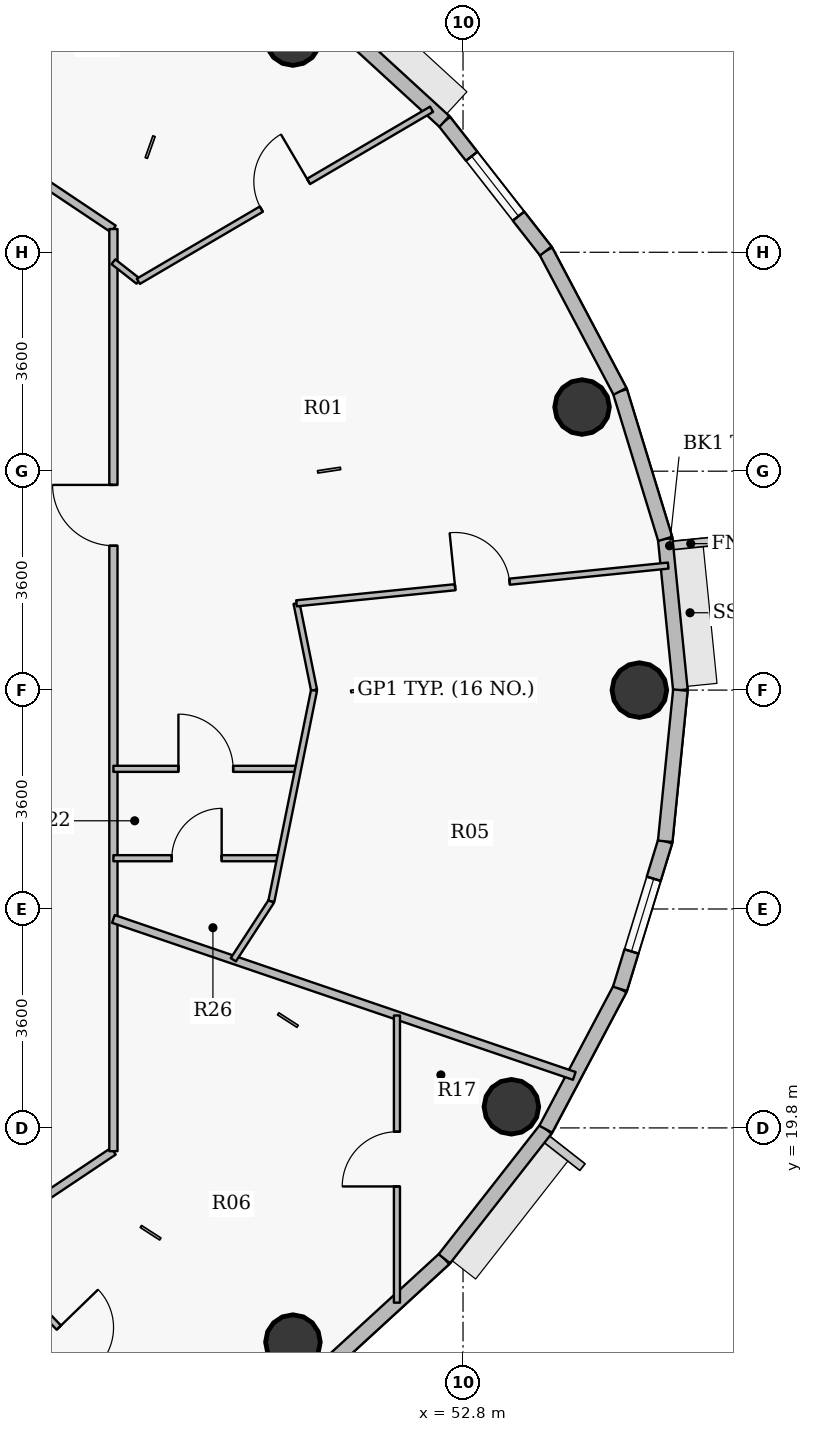
"""IFC4 building model, lengths in metres.
Left out: names, types, materials, properties, quantities, classifications, styles, units other than length and angle.
Written with IfcOpenShell. Run it as: python <this file> out.ifc"""

import sys

from ifc_helpers import new_model, si_unit, direction, frame, frame_2d, origin, origin_2d, place, context, subcontext, project, spatial, rectangle, hollow_circle, extrude, source, transform, mapped, element, fill, save


model = new_model("IFC4")
c1 = context("Model", 3, precision=1e-05, world=origin(), true_north=direction((0.0, 1.0)))
c2 = subcontext(c1, "Body", "Model", "MODEL_VIEW")
j1 = project(units=[si_unit("LENGTHUNIT", "METRE"), si_unit("PLANEANGLEUNIT", "RADIAN")], contexts=[c1])
p1 = place(None, origin())
s1 = spatial("IfcSite", under=j1, at=p1, CompositionType="ELEMENT")
p2 = place(p1, origin())
s2 = spatial("IfcBuilding", under=s1, at=p2, CompositionType="ELEMENT")
p3 = place(p2, frame((0.0, 0.0, 327.8)))
s3 = spatial("IfcBuildingStorey", under=s2, at=p3, CompositionType="ELEMENT", Elevation=327.8)
for number, where, z_axis, x_axis in (
    (1, (55.7, 27.0, 0.0), (0.0, 0.0, 1.0), (1.0, 0.0, 0.0)),
    (2, (54.758, 31.655, 0.0), (0.0, 0.0, 1.0), (1.0, 0.0, 0.0)),
    (3, (50.002, 37.723, 0.0), (0.0, 0.0, 1.0), (1.0, 0.0, 0.0)),
    (4, (50.002, 16.277, 0.0), (0.0, 0.0, 1.0), (1.0, 0.0, 0.0)),
    (5, (53.595, 20.147, 0.0), (0.0, 0.0, 1.0), (1.0, 0.0, 0.0)),
):
    element("IfcColumn", number, at=place(p3, frame(where, z_axis=z_axis, x_axis=x_axis)), inside=s3, PredefinedType="COLUMN", context=c2, shape_type="SweptSolid", body=[
        extrude(hollow_circle(Radius=0.45, WallThickness=0.028, at=origin_2d()), origin(), (0.0, 0.0, 1.0), 3.8),
    ])
p4 = place(p3, frame((56.125, 29.487, 0.0), z_axis=(0.0, 0.0, 1.0), x_axis=(0.100025963401, -0.994984827344, 0.0)))
e6 = element("IfcWall", 6, at=p4, inside=s3, PredefinedType="SOLIDWALL", context=c2, shape_type="SweptSolid", body=[
    extrude(rectangle(XDim=2.499, YDim=0.24, at=frame_2d((1.25, 0.0))), origin(), (0.0, 0.0, 1.0), 3.55),
])
p5 = place(p3, frame((55.381, 31.913, 0.0), z_axis=(0.0, 0.0, 1.0), x_axis=(0.293105547213, -0.956080089842, 0.0)))
e7 = element("IfcWall", 7, at=p5, inside=s3, PredefinedType="SOLIDWALL", context=c2, shape_type="SweptSolid", body=[
    extrude(rectangle(XDim=2.538, YDim=0.24, at=frame_2d((1.269, 0.0))), origin(), (0.0, 0.0, 1.0), 3.55),
])
p6 = place(p3, frame((54.161, 34.221, 0.0), z_axis=(0.0, 0.0, 1.0), x_axis=(0.467487999989, -0.883999417345, 0.0)))
e8 = element("IfcWall", 8, at=p6, inside=s3, PredefinedType="SOLIDWALL", context=c2, shape_type="SweptSolid", body=[
    extrude(rectangle(XDim=2.61, YDim=0.24, at=frame_2d((1.305, 0.0))), origin(), (0.0, 0.0, 1.0), 3.55),
])
p7 = place(p3, frame((52.493, 36.352, 0.0), z_axis=(0.0, 0.0, 1.0), x_axis=(0.616286367698, -0.78752213492, 0.0)))
e9 = element("IfcWall", 9, at=p7, inside=s3, PredefinedType="SOLIDWALL", context=c2, shape_type="SweptSolid", body=[
    extrude(rectangle(XDim=2.706, YDim=0.24, at=frame_2d((1.353, 0.0))), origin(), (0.0, 0.0, 1.0), 3.55),
])
p8 = place(p7, frame((0.728, 0.0, 0.9)))
e10 = element("IfcOpeningElement", 10, at=p8, cuts=e9, PredefinedType="OPENING", context=c2, shape_type="SweptSolid", body=[
    extrude(rectangle(XDim=1.25, YDim=1.65, at=origin_2d()), frame((0.625, 0.13, 0.825), z_axis=(0.0, -1.0, 0.0), x_axis=(1.0, 0.0, 0.0)), (0.0, 0.0, 1.0), 0.26),
])
for number, where, z_axis, x_axis in (
    (11, (50.419, 38.254, 0.0), (0.0, 0.0, 1.0), (0.737, -0.676, 0.0)),
    (12, (52.493, 17.648, 0.0), (0.0, 0.0, 1.0), (-0.737, -0.676, 0.0)),
):
    element("IfcWall", number, at=place(p3, frame(where, z_axis=z_axis, x_axis=x_axis)), inside=s3, PredefinedType="SOLIDWALL", context=c2, shape_type="SweptSolid", body=[
        extrude(rectangle(XDim=2.815, YDim=0.24, at=frame_2d((1.407, 0.0))), origin(), (0.0, 0.0, 1.0), 3.55),
    ])
p9 = place(p3, frame((54.161, 19.779, 0.0), z_axis=(0.0, 0.0, 1.0), x_axis=(-0.616286367698, -0.78752213492, 0.0)))
e13 = element("IfcWall", 13, at=p9, inside=s3, PredefinedType="SOLIDWALL", context=c2, shape_type="SweptSolid", body=[
    extrude(rectangle(XDim=2.706, YDim=0.24, at=frame_2d((1.353, 0.0))), origin(), (0.0, 0.0, 1.0), 3.55),
])
p10 = place(p3, frame((55.381, 22.087, 0.0), z_axis=(0.0, 0.0, 1.0), x_axis=(-0.467487999989, -0.883999417345, 0.0)))
e14 = element("IfcWall", 14, at=p10, inside=s3, PredefinedType="SOLIDWALL", context=c2, shape_type="SweptSolid", body=[
    extrude(rectangle(XDim=2.61, YDim=0.24, at=frame_2d((1.305, 0.0))), origin(), (0.0, 0.0, 1.0), 3.55),
])
p11 = place(p3, frame((56.125, 24.513, 0.0), z_axis=(0.0, 0.0, 1.0), x_axis=(-0.293105547213, -0.956080089842, 0.0)))
e15 = element("IfcWall", 15, at=p11, inside=s3, PredefinedType="SOLIDWALL", context=c2, shape_type="SweptSolid", body=[
    extrude(rectangle(XDim=2.538, YDim=0.24, at=frame_2d((1.269, 0.0))), origin(), (0.0, 0.0, 1.0), 3.55),
])
p12 = place(p11, frame((0.644, 0.0, 0.9)))
e16 = element("IfcOpeningElement", 16, at=p12, cuts=e15, PredefinedType="OPENING", context=c2, shape_type="SweptSolid", body=[
    extrude(rectangle(XDim=1.25, YDim=1.65, at=origin_2d()), frame((0.625, 0.13, 0.825), z_axis=(0.0, -1.0, 0.0), x_axis=(1.0, 0.0, 0.0)), (0.0, 0.0, 1.0), 0.26),
])
p13 = place(p3, frame((56.375, 27.0, 0.0), z_axis=(0.0, 0.0, 1.0), x_axis=(-0.100025963401, -0.994984827344, 0.0)))
e17 = element("IfcWall", 17, at=p13, inside=s3, PredefinedType="SOLIDWALL", context=c2, shape_type="SweptSolid", body=[
    extrude(rectangle(XDim=2.499, YDim=0.24, at=frame_2d((1.25, 0.0))), origin(), (0.0, 0.0, 1.0), 3.55),
])
p14 = place(p3, frame((44.645, 18.073, 0.0), z_axis=(0.0, 0.0, 1.0), x_axis=(0.695656073062, -0.718374991221, 0.0)))
e18 = element("IfcWall", 18, at=p14, inside=s3, PredefinedType="PARTITIONING", context=c2, shape_type="SweptSolid", body=[
    extrude(rectangle(XDim=5.233, YDim=0.1, at=frame_2d((2.617, 0.0))), origin(), (0.0, 0.0, 1.0), 3.035),
])
p15 = place(p14, frame((2.167, 0.0, 0.0)))
e19 = element("IfcOpeningElement", 19, at=p15, cuts=e18, PredefinedType="OPENING", context=c2, shape_type="SweptSolid", body=[
    extrude(rectangle(XDim=0.9, YDim=2.1, at=origin_2d()), frame((0.45, 0.06, 1.05), z_axis=(0.0, -1.0, 0.0), x_axis=(1.0, 0.0, 0.0)), (0.0, 0.0, 1.0), 0.12),
])
for number, where, z_axis, x_axis in (
    (20, (45.541, 18.408, 0.0), (0.0, 0.0, 1.0), (0.831, 0.556, 0.0)),
    (21, (45.541, 35.592, 0.0), (0.0, 0.0, 1.0), (0.831, -0.556, 0.0)),
):
    element("IfcWall", number, at=place(p3, frame(where, z_axis=z_axis, x_axis=x_axis)), inside=s3, PredefinedType="PARTITIONING", context=c2, shape_type="SweptSolid", body=[
        extrude(rectangle(XDim=1.815, YDim=0.135, at=frame_2d((0.908, 0.0))), origin(), (0.0, 0.0, 1.0), 3.085),
    ])
p16 = place(p3, frame((47.05, 19.417, 0.0), z_axis=(0.0, 0.0, 1.0), x_axis=(0.0, 1.0, 0.0)))
e22 = element("IfcWall", 22, at=p16, inside=s3, PredefinedType="PARTITIONING", context=c2, shape_type="SweptSolid", body=[
    extrude(rectangle(XDim=15.165, YDim=0.135, at=frame_2d((7.583, 0.0))), origin(), (0.0, 0.0, 1.0), 3.085),
])
p17 = place(p16, frame((9.957, 0.0, 0.0)))
e23 = element("IfcOpeningElement", 23, at=p17, cuts=e22, PredefinedType="OPENING", context=c2, shape_type="SweptSolid", body=[
    extrude(rectangle(XDim=1.0, YDim=2.15, at=origin_2d()), frame((0.5, 0.078, 1.075), z_axis=(0.0, -1.0, 0.0), x_axis=(1.0, 0.0, 0.0)), (0.0, 0.0, 1.0), 0.155),
])
p18 = place(p3, frame((47.05, 23.237, 0.0), z_axis=(0.0, 0.0, 1.0), x_axis=(0.946614475353, -0.32236785673, 0.0)))
e24 = element("IfcWall", 24, at=p18, inside=s3, PredefinedType="PARTITIONING", context=c2, shape_type="SweptSolid", body=[
    extrude(rectangle(XDim=8.007, YDim=0.135, at=frame_2d((4.004, 0.0))), origin(), (0.0, 0.0, 1.0), 3.035),
])
p19 = place(p3, frame((47.05, 24.235, 0.0), z_axis=(0.0, 0.0, 1.0), x_axis=(1.0, 0.0, 0.0)))
e25 = element("IfcWall", 25, at=p19, inside=s3, PredefinedType="PARTITIONING", context=c2, shape_type="SweptSolid", body=[
    extrude(rectangle(XDim=2.741, YDim=0.1, at=frame_2d((1.37, 0.0))), origin(), (0.0, 0.0, 1.0), 3.55),
])
p20 = place(p19, frame((0.96, 0.0, 0.0)))
e26 = element("IfcOpeningElement", 26, at=p20, cuts=e25, PredefinedType="OPENING", context=c2, shape_type="SweptSolid", body=[
    extrude(rectangle(XDim=0.82, YDim=2.1, at=origin_2d()), frame((0.41, 0.06, 1.05), z_axis=(0.0, -1.0, 0.0), x_axis=(1.0, 0.0, 0.0)), (0.0, 0.0, 1.0), 0.12),
])
p21 = place(p3, frame((47.05, 25.705, 0.0), z_axis=(0.0, 0.0, 1.0), x_axis=(1.0, 0.0, 0.0)))
e27 = element("IfcWall", 27, at=p21, inside=s3, PredefinedType="PARTITIONING", context=c2, shape_type="SweptSolid", body=[
    extrude(rectangle(XDim=3.038, YDim=0.1, at=frame_2d((1.519, 0.0))), origin(), (0.0, 0.0, 1.0), 3.55),
])
p22 = place(p21, frame((1.069, 0.0, 0.0)))
e28 = element("IfcOpeningElement", 28, at=p22, cuts=e27, PredefinedType="OPENING", context=c2, shape_type="SweptSolid", body=[
    extrude(rectangle(XDim=0.9, YDim=2.1, at=origin_2d()), frame((0.45, 0.06, 1.05), z_axis=(0.0, -1.0, 0.0), x_axis=(1.0, 0.0, 0.0)), (0.0, 0.0, 1.0), 0.12),
])
p23 = place(p3, frame((47.05, 34.044, 0.0), z_axis=(0.0, 0.0, 1.0), x_axis=(0.787277370311, -0.616599012483, 0.0)))
e29 = element("IfcWall", 29, at=p23, inside=s3, PredefinedType="PARTITIONING", context=c2, shape_type="SweptSolid", body=[
    extrude(rectangle(XDim=0.521, YDim=0.1, at=frame_2d((0.26, 0.0))), origin(), (0.0, 0.0, 1.0), 3.55),
])
p24 = place(p3, frame((47.46, 33.723, 0.0), z_axis=(0.0, 0.0, 1.0), x_axis=(0.862533037069, 0.506000750952, 0.0)))
e30 = element("IfcWall", 30, at=p24, inside=s3, PredefinedType="PARTITIONING", context=c2, shape_type="SweptSolid", body=[
    extrude(rectangle(XDim=5.591, YDim=0.1, at=frame_2d((2.795, 0.0))), origin(), (0.0, 0.0, 1.0), 3.035),
])
p25 = place(p24, frame((2.345, 0.0, 0.0)))
e31 = element("IfcOpeningElement", 31, at=p25, cuts=e30, PredefinedType="OPENING", context=c2, shape_type="SweptSolid", body=[
    extrude(rectangle(XDim=0.9, YDim=2.1, at=origin_2d()), frame((0.45, 0.06, 1.05), z_axis=(0.0, -1.0, 0.0), x_axis=(1.0, 0.0, 0.0)), (0.0, 0.0, 1.0), 0.12),
])
p26 = place(p3, frame((49.022, 22.565, 0.0), z_axis=(0.0, 0.0, 1.0), x_axis=(0.545436909984, 0.838151881957, 0.0)))
e32 = element("IfcWall", 32, at=p26, inside=s3, PredefinedType="PARTITIONING", context=c2, shape_type="SweptSolid", body=[
    extrude(rectangle(XDim=1.148, YDim=0.1, at=frame_2d((0.574, 0.0))), origin(), (0.0, 0.0, 1.0), 3.55),
])
p27 = place(p3, frame((49.648, 23.527, 0.0), z_axis=(0.0, 0.0, 1.0), x_axis=(0.198249177906, 0.980151653296, 0.0)))
e33 = element("IfcWall", 33, at=p27, inside=s3, PredefinedType="PARTITIONING", context=c2, shape_type="SweptSolid", body=[
    extrude(rectangle(XDim=3.543, YDim=0.1, at=frame_2d((1.771, 0.0))), origin(), (0.0, 0.0, 1.0), 3.085),
])
p28 = place(p3, frame((50.061, 28.427, 0.0), z_axis=(0.0, 0.0, 1.0), x_axis=(0.198372931515, -0.980126614291, 0.0)))
e34 = element("IfcWall", 34, at=p28, inside=s3, PredefinedType="PARTITIONING", context=c2, shape_type="SweptSolid", body=[
    extrude(rectangle(XDim=1.456, YDim=0.1, at=frame_2d((0.728, 0.0))), origin(), (0.0, 0.0, 1.0), 3.085),
])
p29 = place(p3, frame((50.061, 28.427, 0.0), z_axis=(0.0, 0.0, 1.0), x_axis=(0.994890167578, 0.100963134143, 0.0)))
e35 = element("IfcWall", 35, at=p29, inside=s3, PredefinedType="PARTITIONING", context=c2, shape_type="SweptSolid", body=[
    extrude(rectangle(XDim=6.145, YDim=0.1, at=frame_2d((3.072, 0.0))), origin(), (0.0, 0.0, 1.0), 3.035),
])
p30 = place(p29, frame((2.622, 0.0, 0.0)))
e36 = element("IfcOpeningElement", 36, at=p30, cuts=e35, PredefinedType="OPENING", context=c2, shape_type="SweptSolid", body=[
    extrude(rectangle(XDim=0.9, YDim=2.1, at=origin_2d()), frame((0.45, 0.06, 1.05), z_axis=(0.0, -1.0, 0.0), x_axis=(1.0, 0.0, 0.0)), (0.0, 0.0, 1.0), 0.12),
])
p31 = place(p3, frame((51.713, 16.926, 0.0), z_axis=(0.0, 0.0, 1.0), x_axis=(0.0, 1.0, 0.0)))
e37 = element("IfcWall", 37, at=p31, inside=s3, PredefinedType="PARTITIONING", context=c2, shape_type="SweptSolid", body=[
    extrude(rectangle(XDim=4.722, YDim=0.1, at=frame_2d((2.361, 0.0))), origin(), (0.0, 0.0, 1.0), 3.035),
])
p32 = place(p31, frame((1.911, 0.0, 0.0)))
e38 = element("IfcOpeningElement", 38, at=p32, cuts=e37, PredefinedType="OPENING", context=c2, shape_type="SweptSolid", body=[
    extrude(rectangle(XDim=0.9, YDim=2.1, at=origin_2d()), frame((0.45, 0.06, 1.05), z_axis=(0.0, -1.0, 0.0), x_axis=(1.0, 0.0, 0.0)), (0.0, 0.0, 1.0), 0.12),
])
m1 = source(origin(), c2, "Body", "SweptSolid", [
    extrude(rectangle(XDim=1.25, YDim=1.65, at=origin_2d()), frame((0.625, 0.03, 0.825), z_axis=(0.0, -1.0, 0.0), x_axis=(1.0, 0.0, 0.0)), (0.0, 0.0, 1.0), 0.06),
])
p33 = place(p8, origin())
e39 = element("IfcWindow", 39, at=p33, inside=s3, PartitioningType="SINGLE_PANEL", PredefinedType="WINDOW", context=c2, shape_type="MappedRepresentation", body=[
    mapped(m1, transform((0.0, 0.0, 0.0), x_axis=(1.0, 0.0, 0.0), y_axis=(0.0, 1.0, 0.0), z_axis=(0.0, 0.0, 1.0), scale=1.0)),
])
fill(e10, e39)
p34 = place(p12, origin())
e40 = element("IfcWindow", 40, at=p34, inside=s3, PartitioningType="SINGLE_PANEL", PredefinedType="WINDOW", context=c2, shape_type="MappedRepresentation", body=[
    mapped(m1, transform((0.0, 0.0, 0.0), x_axis=(1.0, 0.0, 0.0), y_axis=(0.0, 1.0, 0.0), z_axis=(0.0, 0.0, 1.0), scale=1.0)),
])
fill(e16, e40)
m2 = source(origin(), c2, "Body", "SweptSolid", [
    extrude(rectangle(XDim=0.9, YDim=2.1, at=origin_2d()), frame((0.45, 0.025, 1.05), z_axis=(0.0, -1.0, 0.0), x_axis=(1.0, 0.0, 0.0)), (0.0, 0.0, 1.0), 0.05),
])
p35 = place(p15, origin())
e41 = element("IfcDoor", 41, at=p35, inside=s3, OperationType="SINGLE_SWING_LEFT", PredefinedType="DOOR", context=c2, shape_type="MappedRepresentation", body=[
    mapped(m2, transform((0.0, 0.0, 0.0), x_axis=(1.0, 0.0, 0.0), y_axis=(0.0, 1.0, 0.0), z_axis=(0.0, 0.0, 1.0), scale=1.0)),
])
fill(e19, e41)
p36 = place(p32, origin())
e42 = element("IfcDoor", 42, at=p36, inside=s3, OperationType="SINGLE_SWING_LEFT", PredefinedType="DOOR", context=c2, shape_type="MappedRepresentation", body=[
    mapped(m2, transform((0.0, 0.0, 0.0), x_axis=(1.0, 0.0, 0.0), y_axis=(0.0, 1.0, 0.0), z_axis=(0.0, 0.0, 1.0), scale=1.0)),
])
fill(e38, e42)
m3 = source(origin(), c2, "Body", "SweptSolid", [
    extrude(rectangle(XDim=1.0, YDim=2.15, at=origin_2d()), frame((0.5, 0.025, 1.075), z_axis=(0.0, -1.0, 0.0), x_axis=(1.0, 0.0, 0.0)), (0.0, 0.0, 1.0), 0.05),
])
p37 = place(p17, origin())
e43 = element("IfcDoor", 43, at=p37, inside=s3, OperationType="SINGLE_SWING_RIGHT", PredefinedType="DOOR", context=c2, shape_type="MappedRepresentation", body=[
    mapped(m3, transform((0.0, 0.0, 0.0), x_axis=(1.0, 0.0, 0.0), y_axis=(0.0, 1.0, 0.0), z_axis=(0.0, 0.0, 1.0), scale=1.0)),
])
fill(e23, e43)
p38 = place(p30, origin())
e44 = element("IfcDoor", 44, at=p38, inside=s3, OperationType="SINGLE_SWING_LEFT", PredefinedType="DOOR", context=c2, shape_type="MappedRepresentation", body=[
    mapped(m2, transform((0.0, 0.0, 0.0), x_axis=(1.0, 0.0, 0.0), y_axis=(0.0, 1.0, 0.0), z_axis=(0.0, 0.0, 1.0), scale=1.0)),
])
fill(e36, e44)
p39 = place(p25, origin())
e45 = element("IfcDoor", 45, at=p39, inside=s3, OperationType="SINGLE_SWING_RIGHT", PredefinedType="DOOR", context=c2, shape_type="MappedRepresentation", body=[
    mapped(m2, transform((0.0, 0.0, 0.0), x_axis=(1.0, 0.0, 0.0), y_axis=(0.0, 1.0, 0.0), z_axis=(0.0, 0.0, 1.0), scale=1.0)),
])
fill(e31, e45)
p40 = place(p22, origin())
e46 = element("IfcDoor", 46, at=p40, inside=s3, OperationType="SINGLE_SWING_LEFT", PredefinedType="DOOR", context=c2, shape_type="MappedRepresentation", body=[
    mapped(m2, transform((0.0, 0.0, 0.0), x_axis=(1.0, 0.0, 0.0), y_axis=(0.0, 1.0, 0.0), z_axis=(0.0, 0.0, 1.0), scale=1.0)),
])
fill(e28, e46)
m4 = source(origin(), c2, "Body", "SweptSolid", [
    extrude(rectangle(XDim=0.82, YDim=2.1, at=origin_2d()), frame((0.41, 0.025, 1.05), z_axis=(0.0, -1.0, 0.0), x_axis=(1.0, 0.0, 0.0)), (0.0, 0.0, 1.0), 0.05),
])
p41 = place(p20, origin())
e47 = element("IfcDoor", 47, at=p41, inside=s3, OperationType="SINGLE_SWING_RIGHT", PredefinedType="DOOR", context=c2, shape_type="MappedRepresentation", body=[
    mapped(m4, transform((0.0, 0.0, 0.0), x_axis=(1.0, 0.0, 0.0), y_axis=(0.0, 1.0, 0.0), z_axis=(0.0, 0.0, 1.0), scale=1.0)),
])
fill(e26, e47)
save(model, sys.argv[1])
